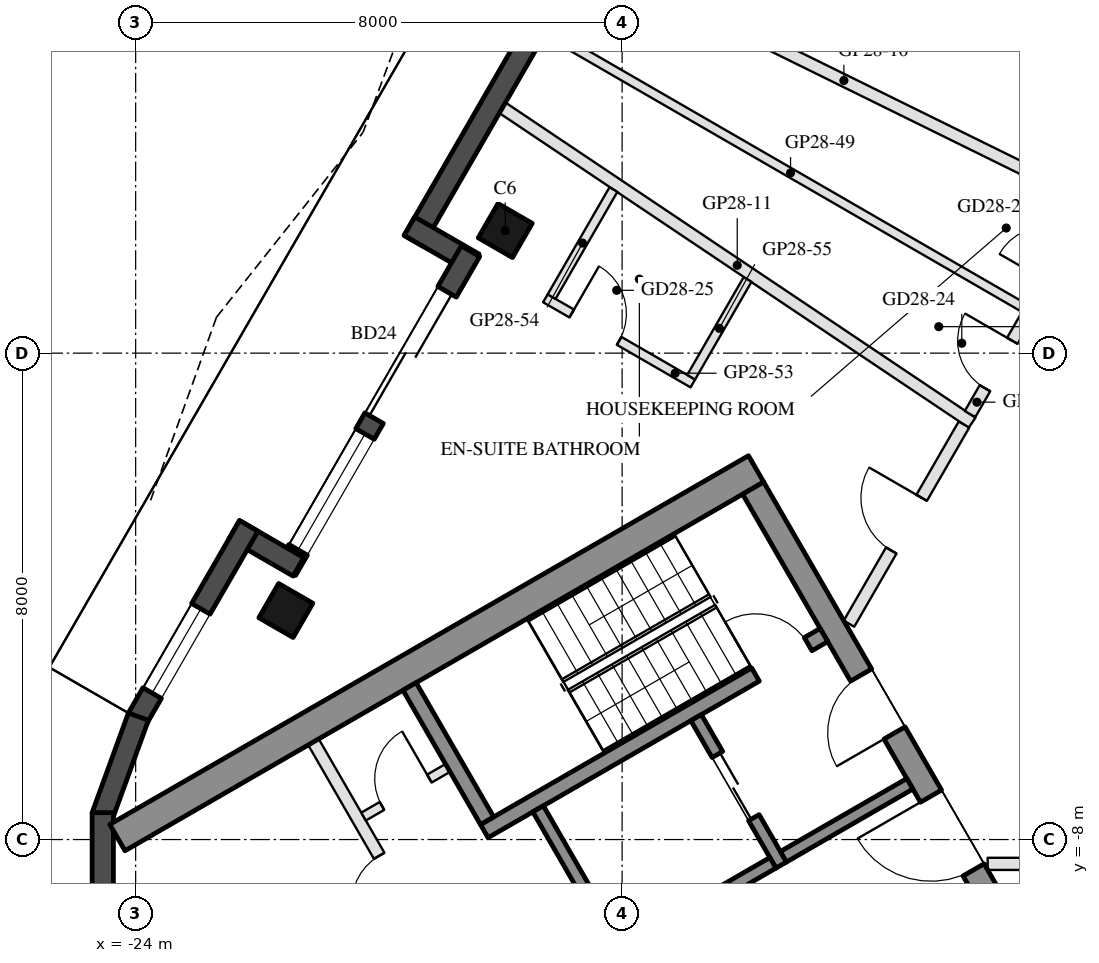
"""IFC4 building model, lengths in metres.
Left out: names, types, materials, properties, quantities, classifications, styles, units other than length and angle.
Written with IfcOpenShell. Run it as: python <this file> out.ifc"""

import sys

from ifc_helpers import new_model, si_unit, direction, frame, frame_2d, origin, origin_2d, place, context, subcontext, project, spatial, rectangle, hollow_rectangle, extrude, boolean, halfspace, element, fill, save


model = new_model("IFC4")
c1 = context("Model", 3, precision=1e-05, world=origin(), true_north=direction((0.0, 1.0)))
c2 = subcontext(c1, "Body", "Model", "MODEL_VIEW")
j1 = project(units=[si_unit("LENGTHUNIT", "METRE"), si_unit("PLANEANGLEUNIT", "RADIAN")], contexts=[c1])
p1 = place(None, origin())
s1 = spatial("IfcSite", under=j1, at=p1, CompositionType="ELEMENT")
p2 = place(p1, origin())
s2 = spatial("IfcBuilding", under=s1, at=p2, CompositionType="ELEMENT")
p3 = place(p2, frame((0.0, 0.0, 283.7)))
s3 = spatial("IfcBuildingStorey", under=s2, at=p3, CompositionType="ELEMENT", Elevation=283.7)
p4 = place(p3, frame((-17.922, 2.016, 0.0), z_axis=(0.0, 0.0, 1.0), x_axis=(0.5, 0.866025403784, 0.0)))
e1 = element("IfcColumn", 1, at=p4, inside=s3, PredefinedType="COLUMN", context=c2, shape_type="SweptSolid", body=[
    boolean("DIFFERENCE", extrude(hollow_rectangle(XDim=0.65, YDim=0.65, WallThickness=0.03, at=origin_2d()), origin(), (0.0, 0.0, 1.0), 3.7), halfspace(frame((0.0, 0.0, 3.66), z_axis=(0.0, 0.0, 1.0), x_axis=(1.0, 0.0, 0.0)), False)),
])
p5 = place(p3, frame((-21.53, -4.233, 0.0), z_axis=(0.0, 0.0, 1.0), x_axis=(0.5, 0.866025403784, 0.0)))
e2 = element("IfcColumn", 2, at=p5, inside=s3, PredefinedType="COLUMN", context=c2, shape_type="SweptSolid", body=[
    boolean("DIFFERENCE", extrude(hollow_rectangle(XDim=0.65, YDim=0.65, WallThickness=0.03, at=origin_2d()), origin(), (0.0, 0.0, 1.0), 3.7), halfspace(frame((0.0, 0.0, 3.653), z_axis=(0.0, 0.0, 1.0), x_axis=(1.0, 0.0, 0.0)), False)),
])
p6 = place(p3, frame((-14.925, 9.656, 0.0), z_axis=(0.0, 0.0, 1.0), x_axis=(-0.500018599098, -0.866014665324, 0.0)))
e3 = element("IfcWall", 3, at=p6, inside=s3, PredefinedType="SOLIDWALL", context=c2, shape_type="SweptSolid", body=[
    extrude(rectangle(XDim=9.015, YDim=0.35, at=frame_2d((4.508, 0.0))), origin(), (0.0, 0.0, 1.0), 3.55),
])
p7 = place(p6, frame((1.613, 0.0, 0.0)))
e4 = element("IfcOpeningElement", 4, at=p7, cuts=e3, PredefinedType="OPENING", context=c2, shape_type="SweptSolid", body=[
    extrude(rectangle(XDim=1.4, YDim=2.4, at=frame_2d((0.7, 1.2))), frame((0.0, 0.185, 0.0), z_axis=(0.0, -1.0, 0.0), x_axis=(1.0, 0.0, 0.0)), (0.0, 0.0, 1.0), 0.37),
])
p8 = place(p3, frame((-19.497, 2.088, 0.0), z_axis=(0.0, 0.0, 1.0), x_axis=(0.866005645448, -0.500034220881, 0.0)))
e5 = element("IfcWall", 5, at=p8, inside=s3, PredefinedType="SOLIDWALL", context=c2, shape_type="SweptSolid", body=[
    extrude(rectangle(XDim=1.22, YDim=0.35, at=frame_2d((0.61, 0.0))), origin(), (0.0, 0.0, 1.0), 3.55),
])
p9 = place(p3, frame((-18.493, 1.676, 0.0), z_axis=(0.0, 0.0, 1.0), x_axis=(-0.499985371027, -0.866033849661, 0.0)))
e6 = element("IfcWall", 6, at=p9, inside=s3, PredefinedType="SOLIDWALL", context=c2, shape_type="SweptSolid", body=[
    extrude(rectangle(XDim=6.055, YDim=0.35, at=frame_2d((3.028, 0.0))), origin(), (0.0, 0.0, 1.0), 3.55),
])
p10 = place(p9, frame((0.77, 0.0, 0.0)))
e7 = element("IfcOpeningElement", 7, at=p10, cuts=e6, PredefinedType="OPENING", context=c2, shape_type="SweptSolid", body=[
    extrude(rectangle(XDim=2.4, YDim=2.4, at=frame_2d((1.2, 1.2))), frame((0.0, 0.185, 0.0), z_axis=(0.0, -1.0, 0.0), x_axis=(1.0, 0.0, 0.0)), (0.0, 0.0, 1.0), 0.37),
])
p11 = place(p9, frame((3.47, 0.0, 0.3)))
e8 = element("IfcOpeningElement", 8, at=p11, cuts=e6, PredefinedType="OPENING", context=c2, shape_type="SweptSolid", body=[
    extrude(rectangle(XDim=2.2, YDim=2.65, at=frame_2d((1.1, 1.325))), frame((0.0, 0.185, 0.0), z_axis=(0.0, -1.0, 0.0), x_axis=(1.0, 0.0, 0.0)), (0.0, 0.0, 1.0), 0.37),
])
p12 = place(p3, frame((-21.323, -3.515, 0.0), z_axis=(0.0, 0.0, 1.0), x_axis=(-0.866092288191, 0.499884134912, 0.0)))
e9 = element("IfcWall", 9, at=p12, inside=s3, PredefinedType="SOLIDWALL", context=c2, shape_type="SweptSolid", body=[
    extrude(rectangle(XDim=1.22, YDim=0.35, at=frame_2d((0.61, 0.0))), origin(), (0.0, 0.0, 1.0), 3.55),
])
p13 = place(p3, frame((-22.14, -2.841, 0.0), z_axis=(0.0, 0.0, 1.0), x_axis=(-0.500040506767, -0.866002015928, 0.0)))
e10 = element("IfcWall", 10, at=p13, inside=s3, PredefinedType="SOLIDWALL", context=c2, shape_type="SweptSolid", body=[
    extrude(rectangle(XDim=3.655, YDim=0.35, at=frame_2d((1.827, 0.0))), origin(), (0.0, 0.0, 1.0), 3.55),
])
p14 = place(p13, frame((1.575, 0.0, 0.3)))
e11 = element("IfcOpeningElement", 11, at=p14, cuts=e10, PredefinedType="OPENING", context=c2, shape_type="SweptSolid", body=[
    extrude(rectangle(XDim=1.6, YDim=2.65, at=frame_2d((0.8, 1.325))), frame((0.0, 0.185, 0.0), z_axis=(0.0, -1.0, 0.0), x_axis=(1.0, 0.0, 0.0)), (0.0, 0.0, 1.0), 0.37),
])
for number, where, z_axis, x_axis in (
    (12, (-23.955, -5.978, 0.0), (0.0, 0.0, 1.0), (-0.342, -0.94, 0.0)),
    (13, (-24.541, -7.558, 0.0), (0.0, 0.0, 1.0), (0.0, -1.0, 0.0)),
):
    element("IfcWall", number, at=place(p3, frame(where, z_axis=z_axis, x_axis=x_axis)), inside=s3, PredefinedType="SOLIDWALL", context=c2, shape_type="SweptSolid", body=[
        extrude(rectangle(XDim=1.745, YDim=0.35, at=frame_2d((0.872, 0.0))), origin(), (0.0, 0.0, 1.0), 3.55),
    ])
p15 = place(p3, frame((-13.797, -1.903, 0.0), z_axis=(0.0, 0.0, 1.0), x_axis=(-0.866024688907, -0.500001238203, 0.0)))
e14 = element("IfcWall", 14, at=p15, inside=s3, PredefinedType="SHEAR", context=c2, shape_type="SweptSolid", body=[
    extrude(rectangle(XDim=12.129, YDim=0.5, at=frame_2d((6.064, 0.0))), origin(), (0.0, 0.0, 1.0), 3.5),
])
p16 = place(p3, frame((-13.845, -2.22, 0.0), z_axis=(0.0, 0.0, 1.0), x_axis=(0.500004234368, -0.866022959057, 0.0)))
e15 = element("IfcWall", 15, at=p16, inside=s3, PredefinedType="SHEAR", context=c2, shape_type="SweptSolid", body=[
    extrude(rectangle(XDim=10.0, YDim=0.4, at=frame_2d((5.0, 0.0))), origin(), (0.0, 0.0, 1.0), 3.5),
])
p17 = place(p16, frame((3.55, 0.0, 0.0)))
e16 = element("IfcOpeningElement", 16, at=p17, cuts=e15, PredefinedType="OPENING", context=c2, shape_type="SweptSolid", body=[
    extrude(rectangle(XDim=1.1, YDim=2.1, at=frame_2d((0.55, 1.05))), frame((0.0, 0.21, 0.0), z_axis=(0.0, -1.0, 0.0), x_axis=(1.0, 0.0, 0.0)), (0.0, 0.0, 1.0), 0.42),
])
p18 = place(p16, frame((5.85, 0.0, 0.0)))
e17 = element("IfcOpeningElement", 17, at=p18, cuts=e15, PredefinedType="OPENING", context=c2, shape_type="SweptSolid", body=[
    extrude(rectangle(XDim=1.4, YDim=2.1, at=frame_2d((0.7, 1.05))), frame((0.0, 0.21, 0.0), z_axis=(0.0, -1.0, 0.0), x_axis=(1.0, 0.0, 0.0)), (0.0, 0.0, 1.0), 0.42),
])
p19 = place(p3, frame((-12.681, -4.636, 0.0), z_axis=(0.0, 0.0, 1.0), x_axis=(-0.866021702275, -0.500006411147, 0.0)))
e18 = element("IfcWall", 18, at=p19, inside=s3, PredefinedType="SHEAR", context=c2, shape_type="SweptSolid", body=[
    extrude(rectangle(XDim=6.45, YDim=0.25, at=frame_2d((3.225, 0.0))), origin(), (0.0, 0.0, 1.0), 3.5),
])
p20 = place(p19, frame((0.3, 0.0, 0.0)))
e19 = element("IfcOpeningElement", 19, at=p20, cuts=e18, PredefinedType="OPENING", context=c2, shape_type="SweptSolid", body=[
    extrude(rectangle(XDim=1.0, YDim=2.1, at=frame_2d((0.5, 1.05))), frame((0.0, 0.135, 0.0), z_axis=(0.0, -1.0, 0.0), x_axis=(1.0, 0.0, 0.0)), (0.0, 0.0, 1.0), 0.27),
])
p21 = place(p3, frame((-19.496, -5.482, 0.0), z_axis=(0.0, 0.0, 1.0), x_axis=(0.499990435942, -0.866030925526, 0.0)))
e20 = element("IfcWall", 20, at=p21, inside=s3, PredefinedType="SHEAR", context=c2, shape_type="SweptSolid", body=[
    extrude(rectangle(XDim=2.55, YDim=0.25, at=frame_2d((1.275, 0.0))), origin(), (0.0, 0.0, 1.0), 3.5),
])
p22 = place(p3, frame((-17.381, -7.495, 0.0), z_axis=(0.0, 0.0, 1.0), x_axis=(0.500011755427, -0.866018616679, 0.0)))
e21 = element("IfcWall", 21, at=p22, inside=s3, PredefinedType="SHEAR", context=c2, shape_type="SweptSolid", body=[
    extrude(rectangle(XDim=2.8, YDim=0.2, at=frame_2d((1.4, 0.0))), origin(), (0.0, 0.0, 1.0), 3.5),
])
p23 = place(p3, frame((-14.783, -5.995, 0.0), z_axis=(0.0, 0.0, 1.0), x_axis=(0.49994636267, -0.866056369097, 0.0)))
e22 = element("IfcWall", 22, at=p23, inside=s3, PredefinedType="SHEAR", context=c2, shape_type="SweptSolid", body=[
    extrude(rectangle(XDim=2.8, YDim=0.2, at=frame_2d((1.4, 0.0))), origin(), (0.0, 0.0, 1.0), 3.5),
])
p24 = place(p23, frame((0.7, 0.0, 0.0)))
e23 = element("IfcOpeningElement", 23, at=p24, cuts=e22, PredefinedType="OPENING", context=c2, shape_type="SweptSolid", body=[
    extrude(rectangle(XDim=1.2, YDim=2.1, at=frame_2d((0.6, 1.05))), frame((0.0, 0.11, 0.0), z_axis=(0.0, -1.0, 0.0), x_axis=(1.0, 0.0, 0.0)), (0.0, 0.0, 1.0), 0.22),
])
p25 = place(p3, frame((-13.52, -8.383, 0.0), z_axis=(0.0, 0.0, 1.0), x_axis=(-0.866034573852, -0.49998411664, 0.0)))
e24 = element("IfcWall", 24, at=p25, inside=s3, PredefinedType="SHEAR", context=c2, shape_type="SweptSolid", body=[
    extrude(rectangle(XDim=2.8, YDim=0.2, at=frame_2d((1.4, 0.0))), origin(), (0.0, 0.0, 1.0), 3.5),
])
p26 = place(p3, frame((-11.268, -7.083, 0.0), z_axis=(0.0, 0.0, 1.0), x_axis=(-0.866050077142, -0.499957262057, 0.0)))
e25 = element("IfcWall", 25, at=p26, inside=s3, PredefinedType="SHEAR", context=c2, shape_type="SweptSolid", body=[
    extrude(rectangle(XDim=2.4, YDim=0.2, at=frame_2d((1.2, 0.0))), origin(), (0.0, 0.0, 1.0), 3.5),
])
p27 = place(p3, frame((-21.076, -6.395, 0.0), z_axis=(0.0, 0.0, 1.0), x_axis=(0.50001468107, -0.866016927499, 0.0)))
e26 = element("IfcWall", 26, at=p27, inside=s3, PredefinedType="PARTITIONING", context=c2, shape_type="SweptSolid", body=[
    extrude(rectangle(XDim=5.4, YDim=0.2, at=frame_2d((2.7, 0.0))), origin(), (0.0, 0.0, 1.0), 3.5),
])
p28 = place(p27, frame((2.163, 0.0, 0.0)))
e27 = element("IfcOpeningElement", 27, at=p28, cuts=e26, PredefinedType="OPENING", context=c2, shape_type="SweptSolid", body=[
    extrude(rectangle(XDim=0.9, YDim=2.1, at=frame_2d((0.45, 1.05))), frame((0.0, 0.11, 0.0), z_axis=(0.0, -1.0, 0.0), x_axis=(1.0, 0.0, 0.0)), (0.0, 0.0, 1.0), 0.22),
])
p29 = place(p27, frame((4.038, 0.0, 0.0)))
e28 = element("IfcOpeningElement", 28, at=p29, cuts=e26, PredefinedType="OPENING", context=c2, shape_type="SweptSolid", body=[
    extrude(rectangle(XDim=0.9, YDim=2.1, at=frame_2d((0.45, 1.05))), frame((0.0, 0.11, 0.0), z_axis=(0.0, -1.0, 0.0), x_axis=(1.0, 0.0, 0.0)), (0.0, 0.0, 1.0), 0.22),
])
p30 = place(p3, frame((-18.866, -6.822, 0.0), z_axis=(0.0, 0.0, 1.0), x_axis=(-0.866028054938, -0.499995408039, 0.0)))
e29 = element("IfcWall", 29, at=p30, inside=s3, PredefinedType="PARTITIONING", context=c2, shape_type="SweptSolid", body=[
    extrude(rectangle(XDim=1.6, YDim=0.15, at=frame_2d((0.8, 0.0))), origin(), (0.0, 0.0, 1.0), 3.5),
])
p31 = place(p30, frame((0.35, 0.0, 0.0)))
e30 = element("IfcOpeningElement", 30, at=p31, cuts=e29, PredefinedType="OPENING", context=c2, shape_type="SweptSolid", body=[
    extrude(rectangle(XDim=0.9, YDim=2.1, at=frame_2d((0.45, 1.05))), frame((0.0, 0.085, 0.0), z_axis=(0.0, -1.0, 0.0), x_axis=(1.0, 0.0, 0.0)), (0.0, 0.0, 1.0), 0.17),
])
p32 = place(p3, frame((-16.524, 6.538, 0.0), z_axis=(0.0, 0.0, 1.0), x_axis=(0.897120251728, -0.441786434762, 0.0)))
e31 = element("IfcWall", 31, at=p32, inside=s3, PredefinedType="PARTITIONING", context=c2, shape_type="SweptSolid", body=[
    extrude(rectangle(XDim=9.299, YDim=0.2, at=frame_2d((4.649, 0.0))), origin(), (0.0, 0.0, 1.0), 3.1),
])
p33 = place(p3, frame((-17.969, 4.035, 0.0), z_axis=(0.0, 0.0, 1.0), x_axis=(0.830560992963, -0.556927676604, 0.0)))
e32 = element("IfcWall", 32, at=p33, inside=s3, PredefinedType="PARTITIONING", context=c2, shape_type="SweptSolid", body=[
    extrude(rectangle(XDim=9.3, YDim=0.2, at=frame_2d((4.65, 0.0))), origin(), (0.0, 0.0, 1.0), 3.1),
])
p34 = place(p3, frame((-5.0, -8.4, 0.0), z_axis=(0.0, 0.0, 1.0), x_axis=(-1.0, 0.0, 0.0)))
e33 = element("IfcWall", 33, at=p34, inside=s3, PredefinedType="PARTITIONING", context=c2, shape_type="SweptSolid", body=[
    extrude(rectangle(XDim=4.988, YDim=0.2, at=frame_2d((2.494, 0.0))), origin(), (0.0, 0.0, 1.0), 3.05),
])
p35 = place(p34, frame((2.05, 0.0, 0.0)))
e34 = element("IfcOpeningElement", 34, at=p35, cuts=e33, PredefinedType="OPENING", context=c2, shape_type="SweptSolid", body=[
    extrude(rectangle(XDim=1.0, YDim=2.1, at=frame_2d((0.5, 1.05))), frame((0.0, 0.11, 0.0), z_axis=(0.0, -1.0, 0.0), x_axis=(1.0, 0.0, 0.0)), (0.0, 0.0, 1.0), 0.22),
])
p36 = place(p3, frame((-9.795, 5.634, 0.0), z_axis=(0.0, 0.0, 1.0), x_axis=(0.866034573852, -0.49998411664, 0.0)))
e35 = element("IfcWall", 35, at=p36, inside=s3, PredefinedType="PARTITIONING", context=c2, shape_type="SweptSolid", body=[
    extrude(rectangle(XDim=2.8, YDim=0.15, at=frame_2d((1.4, 0.0))), origin(), (0.0, 0.0, 1.0), 3.05),
])
p37 = place(p36, frame((0.5, 0.0, 0.0)))
e36 = element("IfcOpeningElement", 36, at=p37, cuts=e35, PredefinedType="OPENING", context=c2, shape_type="SweptSolid", body=[
    extrude(rectangle(XDim=0.9, YDim=2.1, at=frame_2d((0.45, 1.05))), frame((0.0, 0.085, 0.0), z_axis=(0.0, -1.0, 0.0), x_axis=(1.0, 0.0, 0.0)), (0.0, 0.0, 1.0), 0.17),
])
p38 = place(p3, frame((-17.246, 5.286, 0.0), z_axis=(0.0, 0.0, 1.0), x_axis=(0.865746766399, -0.500482303853, 0.0)))
e37 = element("IfcWall", 37, at=p38, inside=s3, PredefinedType="PARTITIONING", context=c2, shape_type="SweptSolid", body=[
    extrude(rectangle(XDim=9.279, YDim=0.15, at=frame_2d((4.639, 0.0))), origin(), (0.0, 0.0, 1.0), 3.1),
])
p39 = place(p3, frame((-10.278, -1.002, 0.0), z_axis=(0.0, 0.0, 1.0), x_axis=(0.499977061294, 0.866038647048, 0.0)))
e38 = element("IfcWall", 38, at=p39, inside=s3, PredefinedType="PARTITIONING", context=c2, shape_type="SweptSolid", body=[
    extrude(rectangle(XDim=1.881, YDim=0.2, at=frame_2d((0.941, 0.0))), origin(), (0.0, 0.0, 1.0), 3.55),
])
p40 = place(p39, frame((0.491, 0.0, 0.0)))
e39 = element("IfcOpeningElement", 39, at=p40, cuts=e38, PredefinedType="OPENING", context=c2, shape_type="SweptSolid", body=[
    extrude(rectangle(XDim=0.9, YDim=2.1, at=frame_2d((0.45, 1.05))), frame((0.0, 0.11, 0.0), z_axis=(0.0, -1.0, 0.0), x_axis=(1.0, 0.0, 0.0)), (0.0, 0.0, 1.0), 0.22),
])
p41 = place(p3, frame((-12.269, -4.45, 0.0), z_axis=(0.0, 0.0, 1.0), x_axis=(0.500000040646, 0.866025380318, 0.0)))
e40 = element("IfcWall", 40, at=p41, inside=s3, PredefinedType="PARTITIONING", context=c2, shape_type="SweptSolid", body=[
    extrude(rectangle(XDim=3.781, YDim=0.2, at=frame_2d((1.891, 0.0))), origin(), (0.0, 0.0, 1.0), 3.05),
])
p42 = place(p41, frame((1.391, 0.0, 0.0)))
e41 = element("IfcOpeningElement", 41, at=p42, cuts=e40, PredefinedType="OPENING", context=c2, shape_type="SweptSolid", body=[
    extrude(rectangle(XDim=1.0, YDim=2.1, at=frame_2d((0.5, 1.05))), frame((0.0, 0.11, 0.0), z_axis=(0.0, -1.0, 0.0), x_axis=(1.0, 0.0, 0.0)), (0.0, 0.0, 1.0), 0.22),
])
p43 = place(p3, frame((-17.262, 0.902, 0.0), z_axis=(0.0, 0.0, 1.0), x_axis=(0.866034573852, -0.49998411664, 0.0)))
e42 = element("IfcWall", 42, at=p43, inside=s3, PredefinedType="PARTITIONING", context=c2, shape_type="SweptSolid", body=[
    extrude(rectangle(XDim=2.8, YDim=0.15, at=frame_2d((1.4, 0.0))), origin(), (0.0, 0.0, 1.0), 3.55),
])
p44 = place(p43, frame((0.5, 0.0, 0.0)))
e43 = element("IfcOpeningElement", 43, at=p44, cuts=e42, PredefinedType="OPENING", context=c2, shape_type="SweptSolid", body=[
    extrude(rectangle(XDim=0.9, YDim=2.1, at=frame_2d((0.45, 1.05))), frame((0.0, 0.085, 0.0), z_axis=(0.0, -1.0, 0.0), x_axis=(1.0, 0.0, 0.0)), (0.0, 0.0, 1.0), 0.17),
])
p45 = place(p3, frame((-16.143, 2.69, 0.0), z_axis=(0.0, 0.0, 1.0), x_axis=(-0.500013496215, -0.866017611601, 0.0)))
e44 = element("IfcWall", 44, at=p45, inside=s3, PredefinedType="PARTITIONING", context=c2, shape_type="SweptSolid", body=[
    extrude(rectangle(XDim=2.033, YDim=0.15, at=frame_2d((1.017, 0.0))), origin(), (0.0, 0.0, 1.0), 3.05),
])
p46 = place(p3, frame((-13.937, 1.211, 0.0), z_axis=(0.0, 0.0, 1.0), x_axis=(-0.500003477455, -0.866023396066, 0.0)))
e45 = element("IfcWall", 45, at=p46, inside=s3, PredefinedType="PARTITIONING", context=c2, shape_type="SweptSolid", body=[
    extrude(rectangle(XDim=1.855, YDim=0.15, at=frame_2d((0.927, 0.0))), origin(), (0.0, 0.0, 1.0), 3.05),
])
p47 = place(p10, frame((2.4, 0.0, 0.0), z_axis=(0.0, 0.0, 1.0), x_axis=(-1.0, 0.0, 0.0)))
e46 = element("IfcDoor", 46, at=p47, inside=s3, OperationType="SLIDING_TO_LEFT", PredefinedType="DOOR", context=c2, shape_type="SweptSolid", body=[
    extrude(rectangle(XDim=2.4, YDim=2.4, at=frame_2d((1.2, 1.2))), frame((0.0, 0.025, 0.0), z_axis=(0.0, -1.0, 0.0), x_axis=(1.0, 0.0, 0.0)), (0.0, 0.0, 1.0), 0.05),
])
fill(e7, e46)
p48 = place(p11, origin())
e47 = element("IfcWindow", 47, at=p48, inside=s3, PartitioningType="SINGLE_PANEL", PredefinedType="WINDOW", context=c2, shape_type="SweptSolid", body=[
    extrude(rectangle(XDim=2.2, YDim=2.65, at=frame_2d((1.1, 1.325))), frame((0.0, 0.03, 0.0), z_axis=(0.0, -1.0, 0.0), x_axis=(1.0, 0.0, 0.0)), (0.0, 0.0, 1.0), 0.06),
])
fill(e8, e47)
p49 = place(p14, origin())
e48 = element("IfcWindow", 48, at=p49, inside=s3, PartitioningType="SINGLE_PANEL", PredefinedType="WINDOW", context=c2, shape_type="SweptSolid", body=[
    extrude(rectangle(XDim=1.6, YDim=2.65, at=frame_2d((0.8, 1.325))), frame((0.0, 0.03, 0.0), z_axis=(0.0, -1.0, 0.0), x_axis=(1.0, 0.0, 0.0)), (0.0, 0.0, 1.0), 0.06),
])
fill(e11, e48)
p50 = place(p24, origin())
e49 = element("IfcDoor", 49, at=p50, inside=s3, OperationType="DOUBLE_DOOR_SLIDING", PredefinedType="DOOR", context=c2, shape_type="SweptSolid", body=[
    extrude(rectangle(XDim=1.2, YDim=2.1, at=frame_2d((0.6, 1.05))), frame((0.0, 0.025, 0.0), z_axis=(0.0, -1.0, 0.0), x_axis=(1.0, 0.0, 0.0)), (0.0, 0.0, 1.0), 0.05),
])
fill(e23, e49)
p51 = place(p31, frame((0.9, 0.0, 0.0), z_axis=(0.0, 0.0, 1.0), x_axis=(-1.0, 0.0, 0.0)))
e50 = element("IfcDoor", 50, at=p51, inside=s3, OperationType="SINGLE_SWING_RIGHT", PredefinedType="DOOR", context=c2, shape_type="SweptSolid", body=[
    extrude(rectangle(XDim=0.9, YDim=2.1, at=frame_2d((0.45, 1.05))), frame((0.0, 0.025, 0.0), z_axis=(0.0, -1.0, 0.0), x_axis=(1.0, 0.0, 0.0)), (0.0, 0.0, 1.0), 0.05),
])
fill(e30, e50)
p52 = place(p28, frame((0.9, 0.0, 0.0), z_axis=(0.0, 0.0, 1.0), x_axis=(-1.0, 0.0, 0.0)))
e51 = element("IfcDoor", 51, at=p52, inside=s3, OperationType="SINGLE_SWING_LEFT", PredefinedType="DOOR", context=c2, shape_type="SweptSolid", body=[
    extrude(rectangle(XDim=0.9, YDim=2.1, at=frame_2d((0.45, 1.05))), frame((0.0, 0.025, 0.0), z_axis=(0.0, -1.0, 0.0), x_axis=(1.0, 0.0, 0.0)), (0.0, 0.0, 1.0), 0.05),
])
fill(e27, e51)
p53 = place(p17, frame((1.1, 0.0, 0.0), z_axis=(0.0, 0.0, 1.0), x_axis=(-1.0, 0.0, 0.0)))
e52 = element("IfcDoor", 52, at=p53, inside=s3, OperationType="SINGLE_SWING_LEFT", PredefinedType="DOOR", context=c2, shape_type="SweptSolid", body=[
    extrude(rectangle(XDim=1.1, YDim=2.1, at=frame_2d((0.55, 1.05))), frame((0.0, 0.025, 0.0), z_axis=(0.0, -1.0, 0.0), x_axis=(1.0, 0.0, 0.0)), (0.0, 0.0, 1.0), 0.05),
])
fill(e16, e52)
p54 = place(p18, frame((1.4, 0.0, 0.0), z_axis=(0.0, 0.0, 1.0), x_axis=(-1.0, 0.0, 0.0)))
e53 = element("IfcDoor", 53, at=p54, inside=s3, OperationType="DOUBLE_DOOR_SINGLE_SWING", PredefinedType="DOOR", context=c2, shape_type="SweptSolid", body=[
    extrude(rectangle(XDim=1.4, YDim=2.1, at=frame_2d((0.7, 1.05))), frame((0.0, 0.025, 0.0), z_axis=(0.0, -1.0, 0.0), x_axis=(1.0, 0.0, 0.0)), (0.0, 0.0, 1.0), 0.05),
])
fill(e17, e53)
p55 = place(p20, frame((1.0, 0.0, 0.0), z_axis=(0.0, 0.0, 1.0), x_axis=(-1.0, 0.0, 0.0)))
e54 = element("IfcDoor", 54, at=p55, inside=s3, OperationType="SINGLE_SWING_LEFT", PredefinedType="DOOR", context=c2, shape_type="SweptSolid", body=[
    extrude(rectangle(XDim=1.0, YDim=2.1, at=frame_2d((0.5, 1.05))), frame((0.0, 0.025, 0.0), z_axis=(0.0, -1.0, 0.0), x_axis=(1.0, 0.0, 0.0)), (0.0, 0.0, 1.0), 0.05),
])
fill(e19, e54)
p56 = place(p40, origin())
e55 = element("IfcDoor", 55, at=p56, inside=s3, OperationType="SINGLE_SWING_RIGHT", PredefinedType="DOOR", context=c2, shape_type="SweptSolid", body=[
    extrude(rectangle(XDim=0.9, YDim=2.1, at=frame_2d((0.45, 1.05))), frame((0.0, 0.025, 0.0), z_axis=(0.0, -1.0, 0.0), x_axis=(1.0, 0.0, 0.0)), (0.0, 0.0, 1.0), 0.05),
])
fill(e39, e55)
p57 = place(p44, origin())
e56 = element("IfcDoor", 56, at=p57, inside=s3, OperationType="SINGLE_SWING_LEFT", PredefinedType="DOOR", context=c2, shape_type="SweptSolid", body=[
    extrude(rectangle(XDim=0.9, YDim=2.1, at=frame_2d((0.45, 1.05))), frame((0.0, 0.025, 0.0), z_axis=(0.0, -1.0, 0.0), x_axis=(1.0, 0.0, 0.0)), (0.0, 0.0, 1.0), 0.05),
])
fill(e43, e56)
p58 = place(p42, origin())
e57 = element("IfcDoor", 57, at=p58, inside=s3, OperationType="SINGLE_SWING_RIGHT", PredefinedType="DOOR", context=c2, shape_type="SweptSolid", body=[
    extrude(rectangle(XDim=1.0, YDim=2.1, at=frame_2d((0.5, 1.05))), frame((0.0, 0.025, 0.0), z_axis=(0.0, -1.0, 0.0), x_axis=(1.0, 0.0, 0.0)), (0.0, 0.0, 1.0), 0.05),
])
fill(e41, e57)
save(model, sys.argv[1])
